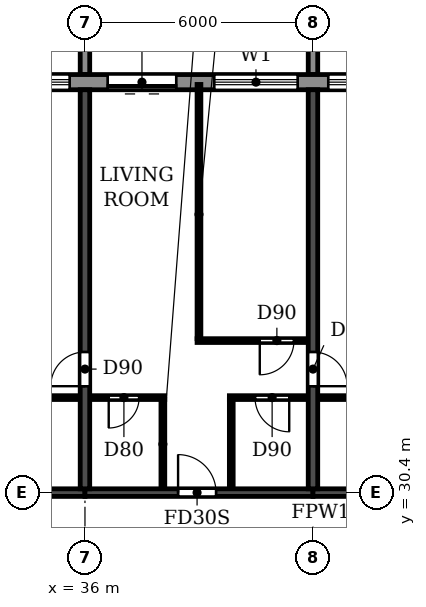
"""IFC4 building model, lengths in metres.
Left out: names, types, materials, properties, quantities, classifications, styles, units other than length and angle.
Written with IfcOpenShell. Run it as: python <this file> out.ifc"""

import sys

from ifc_helpers import new_model, si_unit, direction, frame, frame_2d, origin, place, context, subcontext, project, spatial, polyline, rectangle, outline, extrude, source, transform, mapped, element, fill, save


model = new_model("IFC4")
c1 = context("Model", 3, precision=1e-05, world=origin(), true_north=direction((0.0, 1.0)))
c2 = subcontext(c1, "Body", "Model", "MODEL_VIEW")
j1 = project(units=[si_unit("LENGTHUNIT", "METRE"), si_unit("PLANEANGLEUNIT", "RADIAN")], contexts=[c1])
p1 = place(None, origin())
s1 = spatial("IfcSite", under=j1, at=p1, CompositionType="ELEMENT")
p2 = place(p1, origin())
s2 = spatial("IfcBuilding", under=s1, at=p2, CompositionType="ELEMENT")
p3 = place(p2, frame((0.0, 0.0, 171.9)))
s3 = spatial("IfcBuildingStorey", under=s2, at=p3, CompositionType="ELEMENT", Elevation=171.9)
p4 = place(p3, frame((36.0, 30.5, 0.0), z_axis=(0.0, 0.0, 1.0), x_axis=(0.0, 1.0, 0.0)))
e1 = element("IfcWall", 1, at=p4, inside=s3, PredefinedType="SHEAR", context=c2, shape_type="SweptSolid", body=[
    extrude(rectangle(XDim=10.5, YDim=0.25, at=frame_2d((5.25, 0.0))), origin(), (0.0, 0.0, 1.0), 3.08),
])
p5 = place(p4, frame((2.7, 0.0, 0.0)))
e2 = element("IfcOpeningElement", 2, at=p5, cuts=e1, PredefinedType="OPENING", context=c2, shape_type="SweptSolid", body=[
    extrude(rectangle(XDim=0.9, YDim=2.1, at=frame_2d((0.45, 1.05))), frame((0.0, 0.135, 0.0), z_axis=(0.0, -1.0, 0.0), x_axis=(1.0, 0.0, 0.0)), (0.0, 0.0, 1.0), 0.27),
])
p6 = place(p3, frame((42.0, 30.5, 0.0), z_axis=(0.0, 0.0, 1.0), x_axis=(0.0, 1.0, 0.0)))
e3 = element("IfcWall", 3, at=p6, inside=s3, PredefinedType="SHEAR", context=c2, shape_type="SweptSolid", body=[
    extrude(rectangle(XDim=10.5, YDim=0.25, at=frame_2d((5.25, 0.0))), origin(), (0.0, 0.0, 1.0), 3.08),
])
p7 = place(p6, frame((2.7, 0.0, 0.0)))
e4 = element("IfcOpeningElement", 4, at=p7, cuts=e3, PredefinedType="OPENING", context=c2, shape_type="SweptSolid", body=[
    extrude(rectangle(XDim=0.9, YDim=2.1, at=frame_2d((0.45, 1.05))), frame((0.0, 0.135, 0.0), z_axis=(0.0, -1.0, 0.0), x_axis=(1.0, 0.0, 0.0)), (0.0, 0.0, 1.0), 0.27),
])
p8 = place(p3, frame((30.0, 30.4, 0.0), z_axis=(0.0, 0.0, 1.0), x_axis=(1.0, 0.0, 0.0)))
e5 = element("IfcWall", 5, at=p8, inside=s3, PredefinedType="SHEAR", context=c2, shape_type="SweptSolid", body=[
    extrude(rectangle(XDim=6.0, YDim=0.2, at=frame_2d((3.0, 0.0))), origin(), (0.0, 0.0, 1.0), 2.48),
])
p9 = place(p3, frame((36.0, 30.4, 0.0), z_axis=(0.0, 0.0, 1.0), x_axis=(1.0, 0.0, 0.0)))
e6 = element("IfcWall", 6, at=p9, inside=s3, PredefinedType="SHEAR", context=c2, shape_type="SweptSolid", body=[
    extrude(rectangle(XDim=6.0, YDim=0.2, at=frame_2d((3.0, 0.0))), origin(), (0.0, 0.0, 1.0), 2.48),
])
p10 = place(p9, frame((2.45, 0.0, 0.0)))
e7 = element("IfcOpeningElement", 7, at=p10, cuts=e6, PredefinedType="OPENING", context=c2, shape_type="SweptSolid", body=[
    extrude(rectangle(XDim=1.0, YDim=2.1, at=frame_2d((0.5, 1.05))), frame((0.0, 0.11, 0.0), z_axis=(0.0, -1.0, 0.0), x_axis=(1.0, 0.0, 0.0)), (0.0, 0.0, 1.0), 0.22),
])
p11 = place(p3, frame((42.0, 30.4, 0.0), z_axis=(0.0, 0.0, 1.0), x_axis=(1.0, 0.0, 0.0)))
e8 = element("IfcWall", 8, at=p11, inside=s3, PredefinedType="SHEAR", context=c2, shape_type="SweptSolid", body=[
    extrude(rectangle(XDim=6.0, YDim=0.2, at=frame_2d((3.0, 0.0))), origin(), (0.0, 0.0, 1.0), 2.48),
])
p12 = place(p3, frame((79.317, 41.2, 0.0), z_axis=(0.0, 0.0, 1.0), x_axis=(-1.0, 0.0, 0.0)))
e9 = element("IfcWall", 9, at=p12, inside=s3, PredefinedType="STANDARD", context=c2, shape_type="SweptSolid", body=[
    extrude(rectangle(XDim=56.634, YDim=0.4, at=frame_2d((28.317, 0.0))), origin(), (0.0, 0.0, 1.0), 3.08),
])
p13 = place(p12, frame((52.717, 0.0, 0.9)))
e10 = element("IfcOpeningElement", 10, at=p13, cuts=e9, PredefinedType="OPENING", context=c2, shape_type="SweptSolid", body=[
    extrude(rectangle(XDim=2.2, YDim=1.5, at=frame_2d((1.1, 0.75))), frame((0.0, 0.21, 0.0), z_axis=(0.0, -1.0, 0.0), x_axis=(1.0, 0.0, 0.0)), (0.0, 0.0, 1.0), 0.42),
])
p14 = place(p12, frame((49.917, 0.0, 0.0)))
e11 = element("IfcOpeningElement", 11, at=p14, cuts=e9, PredefinedType="OPENING", context=c2, shape_type="SweptSolid", body=[
    extrude(rectangle(XDim=1.8, YDim=2.4, at=frame_2d((0.9, 1.2))), frame((0.0, 0.21, 0.0), z_axis=(0.0, -1.0, 0.0), x_axis=(1.0, 0.0, 0.0)), (0.0, 0.0, 1.0), 0.42),
])
p15 = place(p12, frame((46.717, 0.0, 0.9)))
e12 = element("IfcOpeningElement", 12, at=p15, cuts=e9, PredefinedType="OPENING", context=c2, shape_type="SweptSolid", body=[
    extrude(rectangle(XDim=2.2, YDim=1.5, at=frame_2d((1.1, 0.75))), frame((0.0, 0.21, 0.0), z_axis=(0.0, -1.0, 0.0), x_axis=(1.0, 0.0, 0.0)), (0.0, 0.0, 1.0), 0.42),
])
p16 = place(p12, frame((43.717, 0.0, 0.9)))
e13 = element("IfcOpeningElement", 13, at=p16, cuts=e9, PredefinedType="OPENING", context=c2, shape_type="SweptSolid", body=[
    extrude(rectangle(XDim=2.2, YDim=1.5, at=frame_2d((1.1, 0.75))), frame((0.0, 0.21, 0.0), z_axis=(0.0, -1.0, 0.0), x_axis=(1.0, 0.0, 0.0)), (0.0, 0.0, 1.0), 0.42),
])
p17 = place(p12, frame((40.917, 0.0, 0.0)))
e14 = element("IfcOpeningElement", 14, at=p17, cuts=e9, PredefinedType="OPENING", context=c2, shape_type="SweptSolid", body=[
    extrude(rectangle(XDim=1.8, YDim=2.4, at=frame_2d((0.9, 1.2))), frame((0.0, 0.21, 0.0), z_axis=(0.0, -1.0, 0.0), x_axis=(1.0, 0.0, 0.0)), (0.0, 0.0, 1.0), 0.42),
])
p18 = place(p12, frame((37.717, 0.0, 0.9)))
e15 = element("IfcOpeningElement", 15, at=p18, cuts=e9, PredefinedType="OPENING", context=c2, shape_type="SweptSolid", body=[
    extrude(rectangle(XDim=2.2, YDim=1.5, at=frame_2d((1.1, 0.75))), frame((0.0, 0.21, 0.0), z_axis=(0.0, -1.0, 0.0), x_axis=(1.0, 0.0, 0.0)), (0.0, 0.0, 1.0), 0.42),
])
p19 = place(p12, frame((34.717, 0.0, 0.9)))
e16 = element("IfcOpeningElement", 16, at=p19, cuts=e9, PredefinedType="OPENING", context=c2, shape_type="SweptSolid", body=[
    extrude(rectangle(XDim=2.2, YDim=1.5, at=frame_2d((1.1, 0.75))), frame((0.0, 0.21, 0.0), z_axis=(0.0, -1.0, 0.0), x_axis=(1.0, 0.0, 0.0)), (0.0, 0.0, 1.0), 0.42),
])
p20 = place(p12, frame((31.717, 0.0, 0.9)))
e17 = element("IfcOpeningElement", 17, at=p20, cuts=e9, PredefinedType="OPENING", context=c2, shape_type="SweptSolid", body=[
    extrude(rectangle(XDim=2.2, YDim=1.5, at=frame_2d((1.1, 0.75))), frame((0.0, 0.21, 0.0), z_axis=(0.0, -1.0, 0.0), x_axis=(1.0, 0.0, 0.0)), (0.0, 0.0, 1.0), 0.42),
])
p21 = place(p12, frame((28.717, 0.0, 0.9)))
e18 = element("IfcOpeningElement", 18, at=p21, cuts=e9, PredefinedType="OPENING", context=c2, shape_type="SweptSolid", body=[
    extrude(rectangle(XDim=2.2, YDim=1.5, at=frame_2d((1.1, 0.75))), frame((0.0, 0.21, 0.0), z_axis=(0.0, -1.0, 0.0), x_axis=(1.0, 0.0, 0.0)), (0.0, 0.0, 1.0), 0.42),
])
p22 = place(p12, frame((25.917, 0.0, 0.0)))
e19 = element("IfcOpeningElement", 19, at=p22, cuts=e9, PredefinedType="OPENING", context=c2, shape_type="SweptSolid", body=[
    extrude(rectangle(XDim=1.8, YDim=2.4, at=frame_2d((0.9, 1.2))), frame((0.0, 0.21, 0.0), z_axis=(0.0, -1.0, 0.0), x_axis=(1.0, 0.0, 0.0)), (0.0, 0.0, 1.0), 0.42),
])
p23 = place(p12, frame((22.717, 0.0, 0.9)))
e20 = element("IfcOpeningElement", 20, at=p23, cuts=e9, PredefinedType="OPENING", context=c2, shape_type="SweptSolid", body=[
    extrude(rectangle(XDim=2.2, YDim=1.5, at=frame_2d((1.1, 0.75))), frame((0.0, 0.21, 0.0), z_axis=(0.0, -1.0, 0.0), x_axis=(1.0, 0.0, 0.0)), (0.0, 0.0, 1.0), 0.42),
])
p24 = place(p12, frame((19.917, 0.0, 0.0)))
e21 = element("IfcOpeningElement", 21, at=p24, cuts=e9, PredefinedType="OPENING", context=c2, shape_type="SweptSolid", body=[
    extrude(rectangle(XDim=1.8, YDim=2.4, at=frame_2d((0.9, 1.2))), frame((0.0, 0.21, 0.0), z_axis=(0.0, -1.0, 0.0), x_axis=(1.0, 0.0, 0.0)), (0.0, 0.0, 1.0), 0.42),
])
p25 = place(p12, frame((16.717, 0.0, 0.9)))
e22 = element("IfcOpeningElement", 22, at=p25, cuts=e9, PredefinedType="OPENING", context=c2, shape_type="SweptSolid", body=[
    extrude(rectangle(XDim=2.2, YDim=1.5, at=frame_2d((1.1, 0.75))), frame((0.0, 0.21, 0.0), z_axis=(0.0, -1.0, 0.0), x_axis=(1.0, 0.0, 0.0)), (0.0, 0.0, 1.0), 0.42),
])
p26 = place(p12, frame((13.717, 0.0, 0.9)))
e23 = element("IfcOpeningElement", 23, at=p26, cuts=e9, PredefinedType="OPENING", context=c2, shape_type="SweptSolid", body=[
    extrude(rectangle(XDim=2.2, YDim=1.5, at=frame_2d((1.1, 0.75))), frame((0.0, 0.21, 0.0), z_axis=(0.0, -1.0, 0.0), x_axis=(1.0, 0.0, 0.0)), (0.0, 0.0, 1.0), 0.42),
])
p27 = place(p12, frame((10.917, 0.0, 0.0)))
e24 = element("IfcOpeningElement", 24, at=p27, cuts=e9, PredefinedType="OPENING", context=c2, shape_type="SweptSolid", body=[
    extrude(rectangle(XDim=1.8, YDim=2.4, at=frame_2d((0.9, 1.2))), frame((0.0, 0.21, 0.0), z_axis=(0.0, -1.0, 0.0), x_axis=(1.0, 0.0, 0.0)), (0.0, 0.0, 1.0), 0.42),
])
p28 = place(p12, frame((7.717, 0.0, 0.9)))
e25 = element("IfcOpeningElement", 25, at=p28, cuts=e9, PredefinedType="OPENING", context=c2, shape_type="SweptSolid", body=[
    extrude(rectangle(XDim=2.2, YDim=1.5, at=frame_2d((1.1, 0.75))), frame((0.0, 0.21, 0.0), z_axis=(0.0, -1.0, 0.0), x_axis=(1.0, 0.0, 0.0)), (0.0, 0.0, 1.0), 0.42),
])
p29 = place(p12, frame((4.717, 0.0, 0.9)))
e26 = element("IfcOpeningElement", 26, at=p29, cuts=e9, PredefinedType="OPENING", context=c2, shape_type="SweptSolid", body=[
    extrude(rectangle(XDim=2.2, YDim=1.5, at=frame_2d((1.1, 0.75))), frame((0.0, 0.21, 0.0), z_axis=(0.0, -1.0, 0.0), x_axis=(1.0, 0.0, 0.0)), (0.0, 0.0, 1.0), 0.42),
])
p30 = place(p12, frame((1.917, 0.0, 0.0)))
e27 = element("IfcOpeningElement", 27, at=p30, cuts=e9, PredefinedType="OPENING", context=c2, shape_type="SweptSolid", body=[
    extrude(rectangle(XDim=1.8, YDim=2.4, at=frame_2d((0.9, 1.2))), frame((0.0, 0.21, 0.0), z_axis=(0.0, -1.0, 0.0), x_axis=(1.0, 0.0, 0.0)), (0.0, 0.0, 1.0), 0.42),
])
m1 = source(origin(), c2, "Body", "SweptSolid", [
    extrude(outline(polyline([(0.0, 0.0), (0.25, 0.0), (0.25, 3.1), (0.0, 3.1), (0.0, 0.0)])), origin(), (0.0, 0.0, 1.0), 3.1),
])
for number, where in (
    (28, (35.875, 41.4, 0.0)),
    (29, (41.875, 41.4, 0.0)),
):
    element("IfcWall", number, at=place(p3, frame(where)), inside=s3, PredefinedType="STANDARD", context=c2, shape_type="MappedRepresentation", body=[
        mapped(m1, transform((0.0, 0.0, 0.0))),
    ])
p31 = place(p3, frame((33.1, 32.9, 0.0), z_axis=(0.0, 0.0, 1.0), x_axis=(1.0, 0.0, 0.0)))
e30 = element("IfcWall", 30, at=p31, inside=s3, PredefinedType="PARTITIONING", context=c2, shape_type="SweptSolid", body=[
    extrude(rectangle(XDim=2.765, YDim=0.1, at=frame_2d((1.382, 0.0))), origin(), (0.0, 0.0, 1.0), 3.08),
])
p32 = place(p31, frame((1.0, 0.0, 0.0)))
e31 = element("IfcOpeningElement", 31, at=p32, cuts=e30, PredefinedType="OPENING", context=c2, shape_type="SweptSolid", body=[
    extrude(rectangle(XDim=0.8, YDim=2.1, at=frame_2d((0.4, 1.05))), frame((0.0, 0.06, 0.0), z_axis=(0.0, -1.0, 0.0), x_axis=(1.0, 0.0, 0.0)), (0.0, 0.0, 1.0), 0.12),
])
p33 = place(p3, frame((36.135, 32.9, 0.0), z_axis=(0.0, 0.0, 1.0), x_axis=(1.0, 0.0, 0.0)))
e32 = element("IfcWall", 32, at=p33, inside=s3, PredefinedType="PARTITIONING", context=c2, shape_type="SweptSolid", body=[
    extrude(rectangle(XDim=1.965, YDim=0.1, at=frame_2d((0.982, 0.0))), origin(), (0.0, 0.0, 1.0), 3.08),
])
p34 = place(p33, frame((0.49, 0.0, 0.0)))
e33 = element("IfcOpeningElement", 33, at=p34, cuts=e32, PredefinedType="OPENING", context=c2, shape_type="SweptSolid", body=[
    extrude(rectangle(XDim=0.8, YDim=2.1, at=frame_2d((0.4, 1.05))), frame((0.0, 0.06, 0.0), z_axis=(0.0, -1.0, 0.0), x_axis=(1.0, 0.0, 0.0)), (0.0, 0.0, 1.0), 0.12),
])
p35 = place(p3, frame((39.8, 32.9, 0.0), z_axis=(0.0, 0.0, 1.0), x_axis=(1.0, 0.0, 0.0)))
e34 = element("IfcWall", 34, at=p35, inside=s3, PredefinedType="PARTITIONING", context=c2, shape_type="SweptSolid", body=[
    extrude(rectangle(XDim=2.065, YDim=0.1, at=frame_2d((1.032, 0.0))), origin(), (0.0, 0.0, 1.0), 3.08),
])
p36 = place(p35, frame((0.675, 0.0, 0.0)))
e35 = element("IfcOpeningElement", 35, at=p36, cuts=e34, PredefinedType="OPENING", context=c2, shape_type="SweptSolid", body=[
    extrude(rectangle(XDim=0.9, YDim=2.1, at=frame_2d((0.45, 1.05))), frame((0.0, 0.06, 0.0), z_axis=(0.0, -1.0, 0.0), x_axis=(1.0, 0.0, 0.0)), (0.0, 0.0, 1.0), 0.12),
])
p37 = place(p3, frame((42.135, 32.9, 0.0), z_axis=(0.0, 0.0, 1.0), x_axis=(1.0, 0.0, 0.0)))
e36 = element("IfcWall", 36, at=p37, inside=s3, PredefinedType="PARTITIONING", context=c2, shape_type="SweptSolid", body=[
    extrude(rectangle(XDim=2.765, YDim=0.1, at=frame_2d((1.382, 0.0))), origin(), (0.0, 0.0, 1.0), 3.08),
])
p38 = place(p37, frame((0.965, 0.0, 0.0)))
e37 = element("IfcOpeningElement", 37, at=p38, cuts=e36, PredefinedType="OPENING", context=c2, shape_type="SweptSolid", body=[
    extrude(rectangle(XDim=0.8, YDim=2.1, at=frame_2d((0.4, 1.05))), frame((0.0, 0.06, 0.0), z_axis=(0.0, -1.0, 0.0), x_axis=(1.0, 0.0, 0.0)), (0.0, 0.0, 1.0), 0.12),
])
p39 = place(p3, frame((38.95, 34.4, 0.0), z_axis=(0.0, 0.0, 1.0), x_axis=(1.0, 0.0, 0.0)))
e38 = element("IfcWall", 38, at=p39, inside=s3, PredefinedType="PARTITIONING", context=c2, shape_type="SweptSolid", body=[
    extrude(rectangle(XDim=2.915, YDim=0.1, at=frame_2d((1.458, 0.0))), origin(), (0.0, 0.0, 1.0), 3.08),
])
p40 = place(p39, frame((1.65, 0.0, 0.0)))
e39 = element("IfcOpeningElement", 39, at=p40, cuts=e38, PredefinedType="OPENING", context=c2, shape_type="SweptSolid", body=[
    extrude(rectangle(XDim=0.9, YDim=2.1, at=frame_2d((0.45, 1.05))), frame((0.0, 0.06, 0.0), z_axis=(0.0, -1.0, 0.0), x_axis=(1.0, 0.0, 0.0)), (0.0, 0.0, 1.0), 0.12),
])
p41 = place(p3, frame((38.05, 30.51, 0.0), z_axis=(0.0, 0.0, 1.0), x_axis=(0.0, 1.0, 0.0)))
e40 = element("IfcWall", 40, at=p41, inside=s3, PredefinedType="PARTITIONING", context=c2, shape_type="SweptSolid", body=[
    extrude(rectangle(XDim=2.34, YDim=0.1, at=frame_2d((1.17, 0.0))), origin(), (0.0, 0.0, 1.0), 3.08),
])
p42 = place(p3, frame((39.0, 34.45, 0.0), z_axis=(0.0, 0.0, 1.0), x_axis=(0.0, 1.0, 0.0)))
e41 = element("IfcWall", 41, at=p42, inside=s3, PredefinedType="PARTITIONING", context=c2, shape_type="SweptSolid", body=[
    extrude(rectangle(XDim=6.69, YDim=0.1, at=frame_2d((3.345, 0.0))), origin(), (0.0, 0.0, 1.0), 3.08),
])
p43 = place(p3, frame((39.85, 30.51, 0.0), z_axis=(0.0, 0.0, 1.0), x_axis=(0.0, 1.0, 0.0)))
e42 = element("IfcWall", 42, at=p43, inside=s3, PredefinedType="PARTITIONING", context=c2, shape_type="SweptSolid", body=[
    extrude(rectangle(XDim=2.34, YDim=0.1, at=frame_2d((1.17, 0.0))), origin(), (0.0, 0.0, 1.0), 3.08),
])
p44 = place(p16, origin())
e43 = element("IfcWindow", 43, at=p44, inside=s3, PartitioningType="DOUBLE_PANEL_HORIZONTAL", PredefinedType="WINDOW", context=c2, shape_type="SweptSolid", body=[
    extrude(rectangle(XDim=2.2, YDim=1.5, at=frame_2d((1.1, 0.75))), frame((0.0, 0.03, 0.0), z_axis=(0.0, -1.0, 0.0), x_axis=(1.0, 0.0, 0.0)), (0.0, 0.0, 1.0), 0.06),
])
fill(e13, e43)
p45 = place(p17, origin())
e44 = element("IfcDoor", 44, at=p45, inside=s3, OperationType="DOUBLE_DOOR_SLIDING", PredefinedType="DOOR", context=c2, shape_type="SweptSolid", body=[
    extrude(rectangle(XDim=1.8, YDim=2.4, at=frame_2d((0.9, 1.2))), frame((0.0, 0.025, 0.0), z_axis=(0.0, -1.0, 0.0), x_axis=(1.0, 0.0, 0.0)), (0.0, 0.0, 1.0), 0.05),
])
fill(e14, e44)
p46 = place(p18, origin())
e45 = element("IfcWindow", 45, at=p46, inside=s3, PartitioningType="DOUBLE_PANEL_HORIZONTAL", PredefinedType="WINDOW", context=c2, shape_type="SweptSolid", body=[
    extrude(rectangle(XDim=2.2, YDim=1.5, at=frame_2d((1.1, 0.75))), frame((0.0, 0.03, 0.0), z_axis=(0.0, -1.0, 0.0), x_axis=(1.0, 0.0, 0.0)), (0.0, 0.0, 1.0), 0.06),
])
fill(e15, e45)
p47 = place(p19, origin())
e46 = element("IfcWindow", 46, at=p47, inside=s3, PartitioningType="DOUBLE_PANEL_HORIZONTAL", PredefinedType="WINDOW", context=c2, shape_type="SweptSolid", body=[
    extrude(rectangle(XDim=2.2, YDim=1.5, at=frame_2d((1.1, 0.75))), frame((0.0, 0.03, 0.0), z_axis=(0.0, -1.0, 0.0), x_axis=(1.0, 0.0, 0.0)), (0.0, 0.0, 1.0), 0.06),
])
fill(e16, e46)
p48 = place(p5, origin())
e47 = element("IfcDoor", 47, at=p48, inside=s3, OperationType="SINGLE_SWING_LEFT", PredefinedType="DOOR", context=c2, shape_type="SweptSolid", body=[
    extrude(rectangle(XDim=0.9, YDim=2.1, at=frame_2d((0.45, 1.05))), frame((0.0, 0.025, 0.0), z_axis=(0.0, -1.0, 0.0), x_axis=(1.0, 0.0, 0.0)), (0.0, 0.0, 1.0), 0.05),
])
fill(e2, e47)
p49 = place(p34, frame((0.8, 0.0, 0.0), z_axis=(0.0, 0.0, 1.0), x_axis=(-1.0, 0.0, 0.0)))
e48 = element("IfcDoor", 48, at=p49, inside=s3, OperationType="SINGLE_SWING_RIGHT", PredefinedType="DOOR", context=c2, shape_type="SweptSolid", body=[
    extrude(rectangle(XDim=0.8, YDim=2.1, at=frame_2d((0.4, 1.05))), frame((0.0, 0.025, 0.0), z_axis=(0.0, -1.0, 0.0), x_axis=(1.0, 0.0, 0.0)), (0.0, 0.0, 1.0), 0.05),
])
fill(e33, e48)
p50 = place(p10, origin())
e49 = element("IfcDoor", 49, at=p50, inside=s3, OperationType="SINGLE_SWING_LEFT", PredefinedType="DOOR", context=c2, shape_type="SweptSolid", body=[
    extrude(rectangle(XDim=1.0, YDim=2.1, at=frame_2d((0.5, 1.05))), frame((0.0, 0.025, 0.0), z_axis=(0.0, -1.0, 0.0), x_axis=(1.0, 0.0, 0.0)), (0.0, 0.0, 1.0), 0.05),
])
fill(e7, e49)
p51 = place(p36, frame((0.9, 0.0, 0.0), z_axis=(0.0, 0.0, 1.0), x_axis=(-1.0, 0.0, 0.0)))
e50 = element("IfcDoor", 50, at=p51, inside=s3, OperationType="SINGLE_SWING_LEFT", PredefinedType="DOOR", context=c2, shape_type="SweptSolid", body=[
    extrude(rectangle(XDim=0.9, YDim=2.1, at=frame_2d((0.45, 1.05))), frame((0.0, 0.025, 0.0), z_axis=(0.0, -1.0, 0.0), x_axis=(1.0, 0.0, 0.0)), (0.0, 0.0, 1.0), 0.05),
])
fill(e35, e50)
p52 = place(p40, frame((0.9, 0.0, 0.0), z_axis=(0.0, 0.0, 1.0), x_axis=(-1.0, 0.0, 0.0)))
e51 = element("IfcDoor", 51, at=p52, inside=s3, OperationType="SINGLE_SWING_RIGHT", PredefinedType="DOOR", context=c2, shape_type="SweptSolid", body=[
    extrude(rectangle(XDim=0.9, YDim=2.1, at=frame_2d((0.45, 1.05))), frame((0.0, 0.025, 0.0), z_axis=(0.0, -1.0, 0.0), x_axis=(1.0, 0.0, 0.0)), (0.0, 0.0, 1.0), 0.05),
])
fill(e39, e51)
p53 = place(p7, frame((0.9, 0.0, 0.0), z_axis=(0.0, 0.0, 1.0), x_axis=(-1.0, 0.0, 0.0)))
e52 = element("IfcDoor", 52, at=p53, inside=s3, OperationType="SINGLE_SWING_RIGHT", PredefinedType="DOOR", context=c2, shape_type="SweptSolid", body=[
    extrude(rectangle(XDim=0.9, YDim=2.1, at=frame_2d((0.45, 1.05))), frame((0.0, 0.025, 0.0), z_axis=(0.0, -1.0, 0.0), x_axis=(1.0, 0.0, 0.0)), (0.0, 0.0, 1.0), 0.05),
])
fill(e4, e52)
save(model, sys.argv[1])
